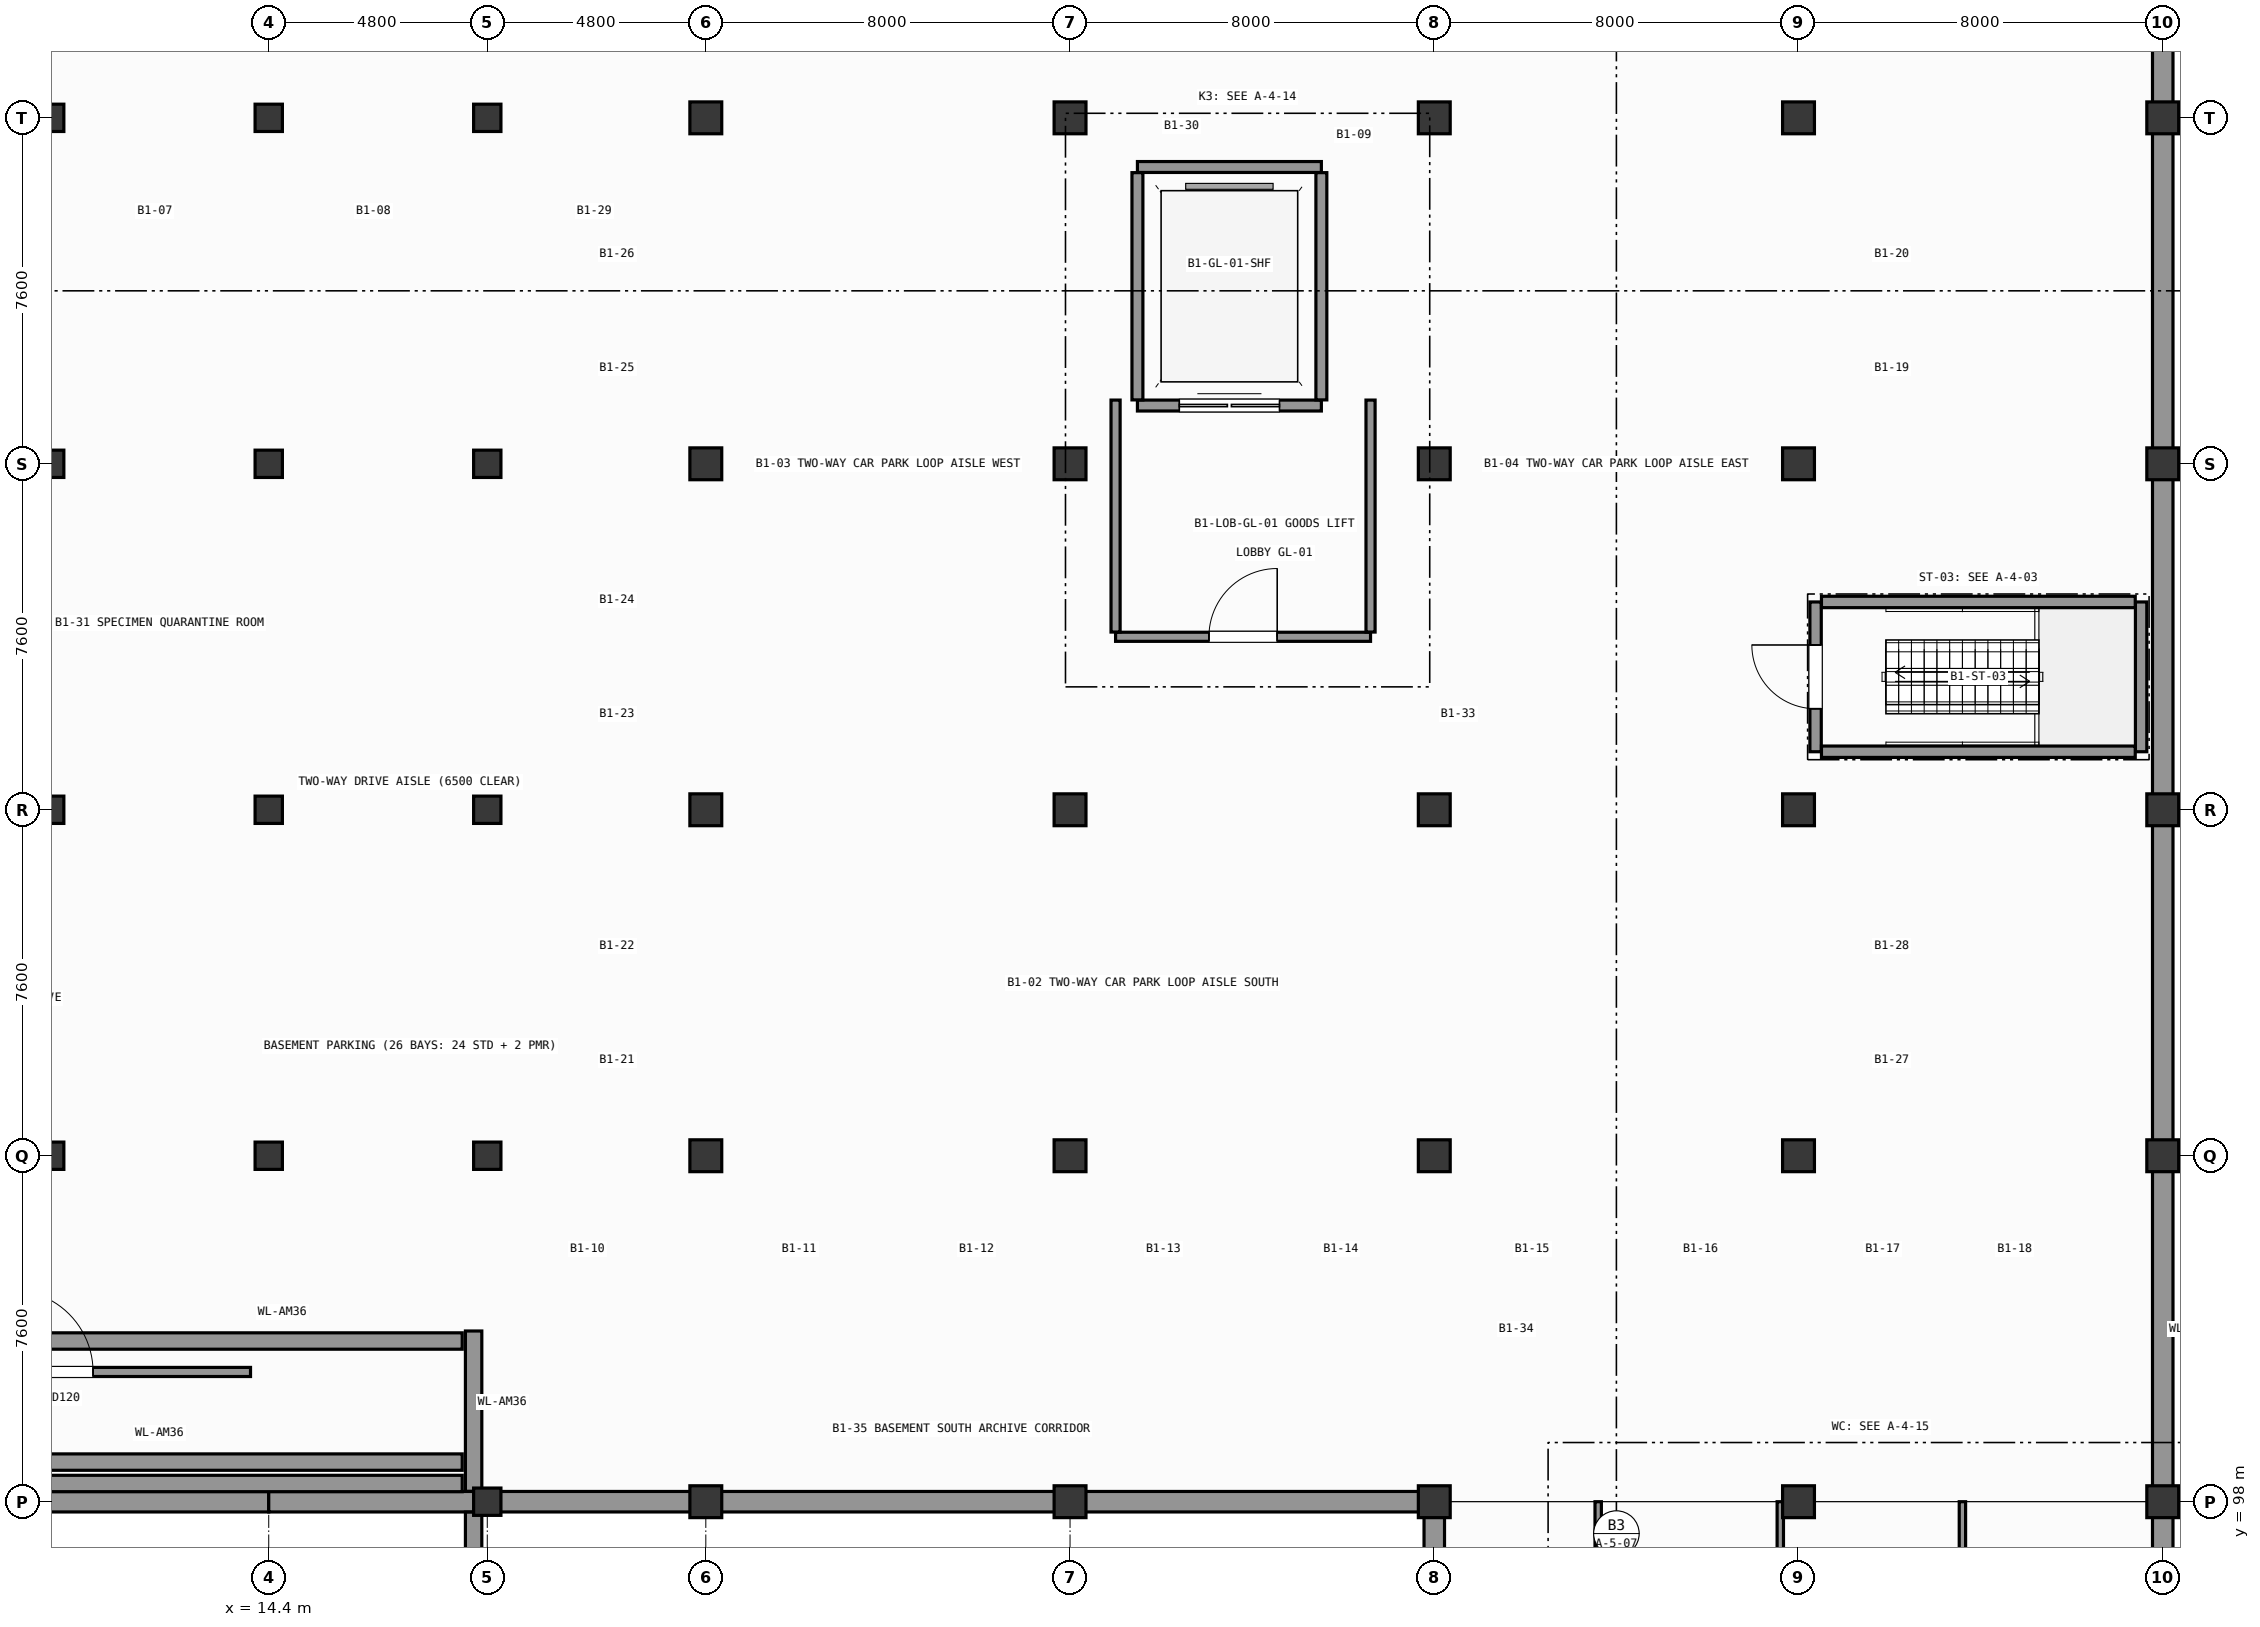
"""IFC4 building model, lengths in metres.
Left out: names, types, materials, properties, quantities, classifications, styles, units other than length and angle.
Written with IfcOpenShell. Run it as: python <this file> out.ifc"""

import sys

from ifc_helpers import new_model, si_unit, direction, frame, frame_2d, origin, origin_2d, place, context, subcontext, project, spatial, rectangle, extrude, element, fill, save


model = new_model("IFC4")
c1 = context("Model", 3, precision=1e-05, world=origin(), true_north=direction((0.0, 1.0)))
c2 = subcontext(c1, "Body", "Model", "MODEL_VIEW")
j1 = project(units=[si_unit("LENGTHUNIT", "METRE"), si_unit("PLANEANGLEUNIT", "RADIAN")], contexts=[c1])
p1 = place(None, origin())
s1 = spatial("IfcSite", under=j1, at=p1, CompositionType="ELEMENT")
p2 = place(p1, origin())
s2 = spatial("IfcBuilding", under=s1, at=p2, CompositionType="ELEMENT")
p3 = place(p2, frame((0.0, 0.0, -4.8)))
s3 = spatial("IfcBuildingStorey", under=s2, at=p3, CompositionType="ELEMENT", Elevation=-4.8)
for number, where, z_axis, x_axis in (
    (1, (9.6, 105.6, 0.0), (0.0, 0.0, 1.0), (1.0, 0.0, 0.0)),
    (2, (9.6, 113.2, 0.0), (0.0, 0.0, 1.0), (1.0, 0.0, 0.0)),
    (3, (9.6, 120.8, 0.0), (0.0, 0.0, 1.0), (1.0, 0.0, 0.0)),
    (4, (9.6, 128.4, 0.0), (0.0, 0.0, 1.0), (1.0, 0.0, 0.0)),
    (5, (14.4, 105.6, 0.0), (0.0, 0.0, 1.0), (1.0, 0.0, 0.0)),
    (6, (14.4, 113.2, 0.0), (0.0, 0.0, 1.0), (1.0, 0.0, 0.0)),
    (7, (14.4, 120.8, 0.0), (0.0, 0.0, 1.0), (1.0, 0.0, 0.0)),
    (8, (14.4, 128.4, 0.0), (0.0, 0.0, 1.0), (1.0, 0.0, 0.0)),
    (9, (19.2, 98.0, 0.0), (0.0, 0.0, 1.0), (1.0, 0.0, 0.0)),
    (10, (19.2, 105.6, 0.0), (0.0, 0.0, 1.0), (1.0, 0.0, 0.0)),
    (11, (19.2, 113.2, 0.0), (0.0, 0.0, 1.0), (1.0, 0.0, 0.0)),
    (12, (19.2, 120.8, 0.0), (0.0, 0.0, 1.0), (1.0, 0.0, 0.0)),
    (13, (19.2, 128.4, 0.0), (0.0, 0.0, 1.0), (1.0, 0.0, 0.0)),
):
    element("IfcColumn", number, at=place(p3, frame(where, z_axis=z_axis, x_axis=x_axis)), inside=s3, PredefinedType="COLUMN", context=c2, shape_type="SweptSolid", body=[
        extrude(rectangle(XDim=0.6, YDim=0.6, at=origin_2d()), origin(), (0.0, 0.0, 1.0), 4.8),
    ])
for number, where, z_axis, x_axis in (
    (14, (24.0, 98.0, 0.0), (0.0, 0.0, 1.0), (1.0, 0.0, 0.0)),
    (15, (24.0, 105.6, 0.0), (0.0, 0.0, 1.0), (1.0, 0.0, 0.0)),
    (16, (24.0, 113.2, 0.0), (0.0, 0.0, 1.0), (1.0, 0.0, 0.0)),
    (17, (24.0, 120.8, 0.0), (0.0, 0.0, 1.0), (1.0, 0.0, 0.0)),
    (18, (24.0, 128.4, 0.0), (0.0, 0.0, 1.0), (1.0, 0.0, 0.0)),
    (19, (32.0, 98.0, 0.0), (0.0, 0.0, 1.0), (1.0, 0.0, 0.0)),
    (20, (32.0, 105.6, 0.0), (0.0, 0.0, 1.0), (1.0, 0.0, 0.0)),
    (21, (32.0, 113.2, 0.0), (0.0, 0.0, 1.0), (1.0, 0.0, 0.0)),
    (22, (32.0, 120.8, 0.0), (0.0, 0.0, 1.0), (1.0, 0.0, 0.0)),
    (23, (32.0, 128.4, 0.0), (0.0, 0.0, 1.0), (1.0, 0.0, 0.0)),
    (24, (40.0, 98.0, 0.0), (0.0, 0.0, 1.0), (1.0, 0.0, 0.0)),
    (25, (40.0, 105.6, 0.0), (0.0, 0.0, 1.0), (1.0, 0.0, 0.0)),
    (26, (40.0, 113.2, 0.0), (0.0, 0.0, 1.0), (1.0, 0.0, 0.0)),
    (27, (40.0, 120.8, 0.0), (0.0, 0.0, 1.0), (1.0, 0.0, 0.0)),
    (28, (40.0, 128.4, 0.0), (0.0, 0.0, 1.0), (1.0, 0.0, 0.0)),
    (29, (48.0, 98.0, 0.0), (0.0, 0.0, 1.0), (1.0, 0.0, 0.0)),
    (30, (48.0, 105.6, 0.0), (0.0, 0.0, 1.0), (1.0, 0.0, 0.0)),
    (31, (48.0, 113.2, 0.0), (0.0, 0.0, 1.0), (1.0, 0.0, 0.0)),
    (32, (48.0, 120.8, 0.0), (0.0, 0.0, 1.0), (1.0, 0.0, 0.0)),
    (33, (48.0, 128.4, 0.0), (0.0, 0.0, 1.0), (1.0, 0.0, 0.0)),
    (34, (56.0, 98.0, 0.0), (0.0, 0.0, 1.0), (1.0, 0.0, 0.0)),
    (35, (56.0, 105.6, 0.0), (0.0, 0.0, 1.0), (1.0, 0.0, 0.0)),
    (36, (56.0, 113.2, 0.0), (0.0, 0.0, 1.0), (1.0, 0.0, 0.0)),
    (37, (56.0, 120.8, 0.0), (0.0, 0.0, 1.0), (1.0, 0.0, 0.0)),
    (38, (56.0, 128.4, 0.0), (0.0, 0.0, 1.0), (1.0, 0.0, 0.0)),
):
    element("IfcColumn", number, at=place(p3, frame(where, z_axis=z_axis, x_axis=x_axis)), inside=s3, PredefinedType="COLUMN", context=c2, shape_type="SweptSolid", body=[
        extrude(rectangle(XDim=0.7, YDim=0.7, at=origin_2d()), origin(), (0.0, 0.0, 1.0), 4.8),
    ])
for number, where, z_axis, x_axis in (
    (39, (56.0, 98.0, 0.0), (0.0, 0.0, 1.0), (0.0, -1.0, 0.0)),
    (40, (56.0, 105.6, 0.0), (0.0, 0.0, 1.0), (0.0, -1.0, 0.0)),
):
    element("IfcWall", number, at=place(p3, frame(where, z_axis=z_axis, x_axis=x_axis)), inside=s3, PredefinedType="USERDEFINED", context=c2, shape_type="SweptSolid", body=[
        extrude(rectangle(XDim=7.6, YDim=0.45, at=frame_2d((3.8, 0.0))), origin(), (0.0, 0.0, 1.0), 4.5),
    ])
p4 = place(p3, frame((56.0, 113.2, 0.0), z_axis=(0.0, 0.0, 1.0), x_axis=(0.0, -1.0, 0.0)))
e41 = element("IfcWall", 41, at=p4, inside=s3, PredefinedType="USERDEFINED", context=c2, shape_type="SweptSolid", body=[
    extrude(rectangle(XDim=7.6, YDim=0.45, at=frame_2d((3.8, 0.0))), origin(), (0.0, 0.0, 1.0), 4.5),
])
p5 = place(p3, frame((56.0, 120.8, 0.0), z_axis=(0.0, 0.0, 1.0), x_axis=(0.0, -1.0, 0.0)))
e42 = element("IfcWall", 42, at=p5, inside=s3, PredefinedType="USERDEFINED", context=c2, shape_type="SweptSolid", body=[
    extrude(rectangle(XDim=7.6, YDim=0.45, at=frame_2d((3.8, 0.0))), origin(), (0.0, 0.0, 1.0), 4.5),
])
p6 = place(p3, frame((56.0, 128.4, 0.0), z_axis=(0.0, 0.0, 1.0), x_axis=(0.0, -1.0, 0.0)))
e43 = element("IfcWall", 43, at=p6, inside=s3, PredefinedType="USERDEFINED", context=c2, shape_type="SweptSolid", body=[
    extrude(rectangle(XDim=7.6, YDim=0.45, at=frame_2d((3.8, 0.0))), origin(), (0.0, 0.0, 1.0), 4.5),
])
p7 = place(p3, frame((56.0, 131.2, 0.0), z_axis=(0.0, 0.0, 1.0), x_axis=(0.0, -1.0, 0.0)))
e44 = element("IfcWall", 44, at=p7, inside=s3, PredefinedType="USERDEFINED", context=c2, shape_type="SweptSolid", body=[
    extrude(rectangle(XDim=2.8, YDim=0.45, at=frame_2d((1.4, 0.0))), origin(), (0.0, 0.0, 1.0), 4.5),
])
p8 = place(p3, frame((14.4, 98.0, 0.0), z_axis=(0.0, 0.0, 1.0), x_axis=(-1.0, 0.0, 0.0)))
e45 = element("IfcWall", 45, at=p8, inside=s3, PredefinedType="USERDEFINED", context=c2, shape_type="SweptSolid", body=[
    extrude(rectangle(XDim=4.8, YDim=0.45, at=frame_2d((2.4, 0.0))), origin(), (0.0, 0.0, 1.0), 4.5),
])
for number, where, z_axis, x_axis in (
    (46, (19.2, 98.0, 0.0), (0.0, 0.0, 1.0), (-1.0, 0.0, 0.0)),
    (47, (24.0, 98.0, 0.0), (0.0, 0.0, 1.0), (-1.0, 0.0, 0.0)),
):
    element("IfcWall", number, at=place(p3, frame(where, z_axis=z_axis, x_axis=x_axis)), inside=s3, PredefinedType="USERDEFINED", context=c2, shape_type="SweptSolid", body=[
        extrude(rectangle(XDim=4.8, YDim=0.45, at=frame_2d((2.4, 0.0))), origin(), (0.0, 0.0, 1.0), 4.5),
    ])
for number, where, z_axis, x_axis in (
    (48, (32.0, 98.0, 0.0), (0.0, 0.0, 1.0), (-1.0, 0.0, 0.0)),
    (49, (40.0, 98.0, 0.0), (0.0, 0.0, 1.0), (-1.0, 0.0, 0.0)),
):
    element("IfcWall", number, at=place(p3, frame(where, z_axis=z_axis, x_axis=x_axis)), inside=s3, PredefinedType="USERDEFINED", context=c2, shape_type="SweptSolid", body=[
        extrude(rectangle(XDim=8.0, YDim=0.45, at=frame_2d((4.0, 0.0))), origin(), (0.0, 0.0, 1.0), 4.5),
    ])
p9 = place(p3, frame((40.0, 90.4, 0.0), z_axis=(0.0, 0.0, 1.0), x_axis=(0.0, 1.0, 0.0)))
e50 = element("IfcWall", 50, at=p9, inside=s3, PredefinedType="USERDEFINED", context=c2, shape_type="SweptSolid", body=[
    extrude(rectangle(XDim=7.371, YDim=0.45, at=frame_2d((3.686, 0.0))), origin(), (0.0, 0.0, 1.0), 4.5),
])
p10 = place(p3, frame((18.9, 86.25, 0.0), z_axis=(0.0, 0.0, 1.0), x_axis=(0.0, 1.0, 0.0)))
e51 = element("IfcWall", 51, at=p10, inside=s3, PredefinedType="SOLIDWALL", context=c2, shape_type="SweptSolid", body=[
    extrude(rectangle(XDim=11.521, YDim=0.36, at=frame_2d((5.76, 0.0))), origin(), (0.0, 0.0, 1.0), 4.8),
])
p11 = place(p3, frame((18.9, 98.229, 0.0), z_axis=(0.0, 0.0, 1.0), x_axis=(0.0, 1.0, 0.0)))
e52 = element("IfcWall", 52, at=p11, inside=s3, PredefinedType="SOLIDWALL", context=c2, shape_type="SweptSolid", body=[
    extrude(rectangle(XDim=3.521, YDim=0.36, at=frame_2d((1.76, 0.0))), origin(), (0.0, 0.0, 1.0), 4.8),
])
for number, where, z_axis, x_axis in (
    (53, (5.35, 98.87, 0.0), (0.0, 0.0, 1.0), (1.0, 0.0, 0.0)),
    (54, (5.35, 101.53, 0.0), (0.0, 0.0, 1.0), (1.0, 0.0, 0.0)),
    (55, (5.35, 98.4, 0.0), (0.0, 0.0, 1.0), (1.0, 0.0, 0.0)),
):
    element("IfcWall", number, at=place(p3, frame(where, z_axis=z_axis, x_axis=x_axis)), inside=s3, PredefinedType="SOLIDWALL", context=c2, shape_type="SweptSolid", body=[
        extrude(rectangle(XDim=13.3, YDim=0.36, at=frame_2d((6.65, 0.0))), origin(), (0.0, 0.0, 1.0), 4.8),
    ])
p12 = place(p3, frame((48.375, 114.475, 0.0), z_axis=(0.0, 0.0, 1.0), x_axis=(0.0, 1.0, 0.0)))
e56 = element("IfcWall", 56, at=p12, inside=s3, PredefinedType="SHEAR", context=c2, shape_type="SweptSolid", body=[
    extrude(rectangle(XDim=3.29, YDim=0.25, at=frame_2d((1.645, 0.0))), origin(), (0.0, 0.0, 1.0), 4.5),
])
p13 = place(p12, frame((0.945, 0.0, 0.0)))
e57 = element("IfcOpeningElement", 57, at=p13, cuts=e56, PredefinedType="OPENING", context=c2, shape_type="SweptSolid", body=[
    extrude(rectangle(XDim=1.4, YDim=2.2, at=frame_2d((0.7, 1.1))), frame((0.0, 0.135, 0.0), z_axis=(0.0, -1.0, 0.0), x_axis=(1.0, 0.0, 0.0)), (0.0, 0.0, 1.0), 0.27),
])
p14 = place(p3, frame((55.525, 114.475, 0.0), z_axis=(0.0, 0.0, 1.0), x_axis=(0.0, 1.0, 0.0)))
e58 = element("IfcWall", 58, at=p14, inside=s3, PredefinedType="SHEAR", context=c2, shape_type="SweptSolid", body=[
    extrude(rectangle(XDim=3.29, YDim=0.25, at=frame_2d((1.645, 0.0))), origin(), (0.0, 0.0, 1.0), 4.5),
])
for number, where, z_axis, x_axis in (
    (59, (48.504, 114.475, 0.0), (0.0, 0.0, 1.0), (1.0, 0.0, 0.0)),
    (60, (48.504, 117.765, 0.0), (0.0, 0.0, 1.0), (1.0, 0.0, 0.0)),
):
    element("IfcWall", number, at=place(p3, frame(where, z_axis=z_axis, x_axis=x_axis)), inside=s3, PredefinedType="SHEAR", context=c2, shape_type="SweptSolid", body=[
        extrude(rectangle(XDim=6.892, YDim=0.25, at=frame_2d((3.446, 0.0))), origin(), (0.0, 0.0, 1.0), 4.5),
    ])
p15 = place(p3, frame((33.48, 122.08, 0.0), z_axis=(0.0, 0.0, 1.0), x_axis=(1.0, 0.0, 0.0)))
e61 = element("IfcWall", 61, at=p15, inside=s3, PredefinedType="SHEAR", context=c2, shape_type="SweptSolid", body=[
    extrude(rectangle(XDim=4.04, YDim=0.24, at=frame_2d((2.02, 0.0))), origin(), (0.0, 0.0, 1.0), 4.5),
])
p16 = place(p15, frame((0.92, 0.0, 0.0)))
e62 = element("IfcOpeningElement", 62, at=p16, cuts=e61, PredefinedType="OPENING", context=c2, shape_type="SweptSolid", body=[
    extrude(rectangle(XDim=2.2, YDim=2.6, at=frame_2d((1.1, 1.3))), frame((0.0, 0.13, 0.0), z_axis=(0.0, -1.0, 0.0), x_axis=(1.0, 0.0, 0.0)), (0.0, 0.0, 1.0), 0.26),
])
p17 = place(p3, frame((33.48, 127.32, 0.0), z_axis=(0.0, 0.0, 1.0), x_axis=(1.0, 0.0, 0.0)))
e63 = element("IfcWall", 63, at=p17, inside=s3, PredefinedType="SHEAR", context=c2, shape_type="SweptSolid", body=[
    extrude(rectangle(XDim=4.04, YDim=0.24, at=frame_2d((2.02, 0.0))), origin(), (0.0, 0.0, 1.0), 4.5),
])
for number, where, z_axis, x_axis in (
    (64, (33.48, 122.204, 0.0), (0.0, 0.0, 1.0), (0.0, 1.0, 0.0)),
    (65, (37.52, 122.204, 0.0), (0.0, 0.0, 1.0), (0.0, 1.0, 0.0)),
):
    element("IfcWall", number, at=place(p3, frame(where, z_axis=z_axis, x_axis=x_axis)), inside=s3, PredefinedType="SHEAR", context=c2, shape_type="SweptSolid", body=[
        extrude(rectangle(XDim=4.992, YDim=0.24, at=frame_2d((2.496, 0.0))), origin(), (0.0, 0.0, 1.0), 4.5),
    ])
p18 = place(p3, frame((33.0, 117.0, 0.0), z_axis=(0.0, 0.0, 1.0), x_axis=(1.0, 0.0, 0.0)))
e66 = element("IfcWall", 66, at=p18, inside=s3, PredefinedType="PARTITIONING", context=c2, shape_type="SweptSolid", body=[
    extrude(rectangle(XDim=5.6, YDim=0.2, at=frame_2d((2.8, 0.0))), origin(), (0.0, 0.0, 1.0), 4.5),
])
p19 = place(p18, frame((2.05, 0.0, 0.0)))
e67 = element("IfcOpeningElement", 67, at=p19, cuts=e66, PredefinedType="OPENING", context=c2, shape_type="SweptSolid", body=[
    extrude(rectangle(XDim=1.5, YDim=2.2, at=frame_2d((0.75, 1.1))), frame((0.0, 0.11, 0.0), z_axis=(0.0, -1.0, 0.0), x_axis=(1.0, 0.0, 0.0)), (0.0, 0.0, 1.0), 0.22),
])
for number, where, z_axis, x_axis in (
    (68, (33.0, 117.104, 0.0), (0.0, 0.0, 1.0), (0.0, 1.0, 0.0)),
    (69, (38.6, 117.104, 0.0), (0.0, 0.0, 1.0), (0.0, 1.0, 0.0)),
):
    element("IfcWall", number, at=place(p3, frame(where, z_axis=z_axis, x_axis=x_axis)), inside=s3, PredefinedType="PARTITIONING", context=c2, shape_type="SweptSolid", body=[
        extrude(rectangle(XDim=5.096, YDim=0.2, at=frame_2d((2.548, 0.0))), origin(), (0.0, 0.0, 1.0), 4.5),
    ])
p20 = place(p3, frame((5.284, 100.85, 0.0), z_axis=(0.0, 0.0, 1.0), x_axis=(1.0, 0.0, 0.0)))
e70 = element("IfcWall", 70, at=p20, inside=s3, PredefinedType="PARTITIONING", context=c2, shape_type="SweptSolid", body=[
    extrude(rectangle(XDim=8.716, YDim=0.2, at=frame_2d((4.358, 0.0))), origin(), (0.0, 0.0, 1.0), 4.5),
])
p21 = place(p20, frame((3.458, 0.0, 0.0)))
e71 = element("IfcOpeningElement", 71, at=p21, cuts=e70, PredefinedType="OPENING", context=c2, shape_type="SweptSolid", body=[
    extrude(rectangle(XDim=1.8, YDim=2.4, at=frame_2d((0.9, 1.2))), frame((0.0, 0.11, 0.0), z_axis=(0.0, -1.0, 0.0), x_axis=(1.0, 0.0, 0.0)), (0.0, 0.0, 1.0), 0.22),
])
p22 = place(p3, frame((43.6, 93.2, 0.0), z_axis=(0.0, 0.0, 1.0), x_axis=(0.0, 1.0, 0.0)))
e72 = element("IfcWall", 72, at=p22, inside=s3, PredefinedType="PARTITIONING", context=c2, shape_type="SweptSolid", body=[
    extrude(rectangle(XDim=4.8, YDim=0.14, at=frame_2d((2.4, 0.0))), origin(), (0.0, 0.0, 1.0), 4.5),
])
p23 = place(p22, frame((1.925, 0.0, 0.0)))
e73 = element("IfcOpeningElement", 73, at=p23, cuts=e72, PredefinedType="OPENING", context=c2, shape_type="SweptSolid", body=[
    extrude(rectangle(XDim=0.95, YDim=2.1, at=frame_2d((0.475, 1.05))), frame((0.0, 0.08, 0.0), z_axis=(0.0, -1.0, 0.0), x_axis=(1.0, 0.0, 0.0)), (0.0, 0.0, 1.0), 0.16),
])
for number, where, z_axis, x_axis in (
    (74, (47.6, 93.2, 0.0), (0.0, 0.0, 1.0), (0.0, 1.0, 0.0)),
    (75, (51.6, 93.2, 0.0), (0.0, 0.0, 1.0), (0.0, 1.0, 0.0)),
):
    element("IfcWall", number, at=place(p3, frame(where, z_axis=z_axis, x_axis=x_axis)), inside=s3, PredefinedType="PARTITIONING", context=c2, shape_type="SweptSolid", body=[
        extrude(rectangle(XDim=4.8, YDim=0.14, at=frame_2d((2.4, 0.0))), origin(), (0.0, 0.0, 1.0), 4.5),
    ])
p24 = place(p13, origin())
e76 = element("IfcDoor", 76, at=p24, inside=s3, OperationType="SINGLE_SWING_RIGHT", PredefinedType="DOOR", context=c2, shape_type="SweptSolid", body=[
    extrude(rectangle(XDim=1.4, YDim=2.2, at=frame_2d((0.7, 1.1))), frame((0.0, 0.025, 0.0), z_axis=(0.0, -1.0, 0.0), x_axis=(1.0, 0.0, 0.0)), (0.0, 0.0, 1.0), 0.05),
])
fill(e57, e76)
p25 = place(p16, origin())
e77 = element("IfcDoor", 77, at=p25, inside=s3, OperationType="DOUBLE_DOOR_SLIDING", PredefinedType="DOOR", context=c2, shape_type="SweptSolid", body=[
    extrude(rectangle(XDim=2.2, YDim=2.6, at=frame_2d((1.1, 1.3))), frame((0.0, 0.025, 0.0), z_axis=(0.0, -1.0, 0.0), x_axis=(1.0, 0.0, 0.0)), (0.0, 0.0, 1.0), 0.05),
])
fill(e62, e77)
p26 = place(p19, origin())
e78 = element("IfcDoor", 78, at=p26, inside=s3, OperationType="SINGLE_SWING_RIGHT", PredefinedType="DOOR", context=c2, shape_type="SweptSolid", body=[
    extrude(rectangle(XDim=1.5, YDim=2.2, at=frame_2d((0.75, 1.1))), frame((0.0, 0.025, 0.0), z_axis=(0.0, -1.0, 0.0), x_axis=(1.0, 0.0, 0.0)), (0.0, 0.0, 1.0), 0.05),
])
fill(e67, e78)
p27 = place(p21, origin())
e79 = element("IfcDoor", 79, at=p27, inside=s3, OperationType="SINGLE_SWING_LEFT", PredefinedType="DOOR", context=c2, shape_type="SweptSolid", body=[
    extrude(rectangle(XDim=1.8, YDim=2.4, at=frame_2d((0.9, 1.2))), frame((0.0, 0.025, 0.0), z_axis=(0.0, -1.0, 0.0), x_axis=(1.0, 0.0, 0.0)), (0.0, 0.0, 1.0), 0.05),
])
fill(e71, e79)
save(model, sys.argv[1])
